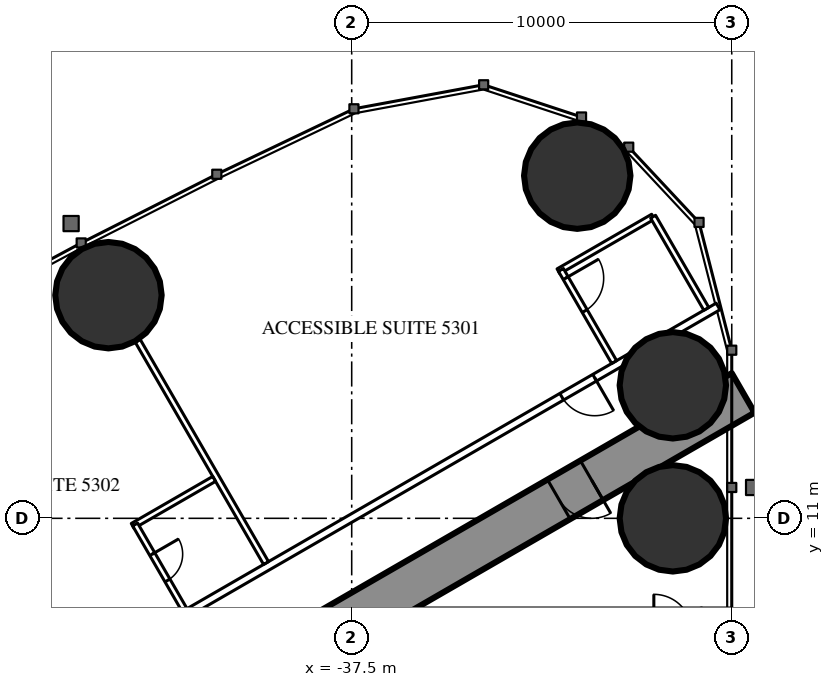
"""IFC4 building model, lengths in metres.
Left out: names, types, materials, properties, quantities, classifications, styles, units other than length and angle.
Written with IfcOpenShell. Run it as: python <this file> out.ifc"""

import sys

from ifc_helpers import new_model, si_unit, direction, frame, frame_2d, origin, origin_2d, place, context, subcontext, project, spatial, rectangle, circle, extrude, element, fill, save


model = new_model("IFC4")
c1 = context("Model", 3, precision=1e-05, world=origin(), true_north=direction((0.0, 1.0)))
c2 = subcontext(c1, "Body", "Model", "MODEL_VIEW")
j1 = project(units=[si_unit("LENGTHUNIT", "METRE"), si_unit("PLANEANGLEUNIT", "RADIAN")], contexts=[c1])
p1 = place(None, origin())
s1 = spatial("IfcSite", under=j1, at=p1, CompositionType="ELEMENT")
p2 = place(p1, origin())
s2 = spatial("IfcBuilding", under=s1, at=p2, CompositionType="ELEMENT")
p3 = place(p2, frame((0.0, 0.0, 198.3)))
s3 = spatial("IfcBuildingStorey", under=s2, at=p3, CompositionType="ELEMENT", Elevation=198.3)
for number, where, z_axis, x_axis in (
    (1, (-31.565, 20.016, 0.0), (0.0, 0.0, 1.0), (1.0, 0.0, 0.0)),
    (2, (-29.05, 11.0, 0.0), (0.0, 0.0, 1.0), (1.0, 0.0, 0.0)),
    (3, (-29.05, 14.5, 0.0), (0.0, 0.0, 1.0), (1.0, 0.0, 0.0)),
    (4, (-43.9, 16.871, 0.0), (0.0, 0.0, 1.0), (1.0, 0.0, 0.0)),
):
    element("IfcColumn", number, at=place(p3, frame(where, z_axis=z_axis, x_axis=x_axis)), inside=s3, PredefinedType="COLUMN", context=c2, shape_type="SweptSolid", body=[
        extrude(circle(Radius=1.4, at=origin_2d()), origin(), (0.0, 0.0, 1.0), 3.5),
    ])
p4 = place(p3, frame((-27.2, 14.3, 0.0), z_axis=(0.0, 0.0, 1.0), x_axis=(-0.866026593062, -0.499997940104, 0.0)))
e5 = element("IfcWall", 5, at=p4, inside=s3, PredefinedType="SHEAR", context=c2, shape_type="SweptSolid", body=[
    extrude(rectangle(XDim=28.946, YDim=1.2, at=frame_2d((14.473, 0.0))), origin(), (0.0, 0.0, 1.0), 3.5),
])
p5 = place(p4, frame((4.6, 0.0, 0.0)))
e6 = element("IfcOpeningElement", 6, at=p5, cuts=e5, PredefinedType="OPENING", context=c2, shape_type="SweptSolid", body=[
    extrude(rectangle(XDim=1.0, YDim=2.2, at=frame_2d((0.5, 1.1))), frame((0.0, 0.61, 0.0), z_axis=(0.0, -1.0, 0.0), x_axis=(1.0, 0.0, 0.0)), (0.0, 0.0, 1.0), 1.22),
])
p6 = place(p4, frame((13.395, 0.0, 0.0)))
e7 = element("IfcOpeningElement", 7, at=p6, cuts=e5, PredefinedType="OPENING", context=c2, shape_type="SweptSolid", body=[
    extrude(rectangle(XDim=1.8, YDim=2.2, at=frame_2d((0.9, 1.1))), frame((0.0, 0.61, 0.0), z_axis=(0.0, -1.0, 0.0), x_axis=(1.0, 0.0, 0.0)), (0.0, 0.0, 1.0), 1.22),
])
p7 = place(p3, frame((-27.86, 16.575, 0.0), z_axis=(0.0, 0.0, 1.0), x_axis=(-0.866025533911, -0.499999774615, 0.0)))
e8 = element("IfcWall", 8, at=p7, inside=s3, PredefinedType="PARTITIONING", context=c2, shape_type="SweptSolid", body=[
    extrude(rectangle(XDim=33.149, YDim=0.2, at=frame_2d((16.575, 0.0))), origin(), (0.0, 0.0, 1.0), 3.25),
])
p8 = place(p7, frame((3.75, 0.0, 0.0)))
e9 = element("IfcOpeningElement", 9, at=p8, cuts=e8, PredefinedType="OPENING", context=c2, shape_type="SweptSolid", body=[
    extrude(rectangle(XDim=1.0, YDim=2.2, at=frame_2d((0.5, 1.1))), frame((0.0, 0.11, 0.0), z_axis=(0.0, -1.0, 0.0), x_axis=(1.0, 0.0, 0.0)), (0.0, 0.0, 1.0), 0.22),
])
p9 = place(p7, frame((16.402, 0.0, 0.0)))
e10 = element("IfcOpeningElement", 10, at=p9, cuts=e8, PredefinedType="OPENING", context=c2, shape_type="SweptSolid", body=[
    extrude(rectangle(XDim=0.95, YDim=2.2, at=frame_2d((0.475, 1.1))), frame((0.0, 0.11, 0.0), z_axis=(0.0, -1.0, 0.0), x_axis=(1.0, 0.0, 0.0)), (0.0, 0.0, 1.0), 0.22),
])
p10 = place(p7, frame((22.047, 0.0, 0.0)))
e11 = element("IfcOpeningElement", 11, at=p10, cuts=e8, PredefinedType="OPENING", context=c2, shape_type="SweptSolid", body=[
    extrude(rectangle(XDim=0.95, YDim=2.2, at=frame_2d((0.475, 1.1))), frame((0.0, 0.11, 0.0), z_axis=(0.0, -1.0, 0.0), x_axis=(1.0, 0.0, 0.0)), (0.0, 0.0, 1.0), 0.22),
])
p11 = place(p7, frame((30.396, 0.0, 0.0)))
e12 = element("IfcOpeningElement", 12, at=p11, cuts=e8, PredefinedType="OPENING", context=c2, shape_type="SweptSolid", body=[
    extrude(rectangle(XDim=1.8, YDim=2.2, at=frame_2d((0.9, 1.1))), frame((0.0, 0.11, 0.0), z_axis=(0.0, -1.0, 0.0), x_axis=(1.0, 0.0, 0.0)), (0.0, 0.0, 1.0), 0.22),
])
p12 = place(p3, frame((-39.754, 9.823, 0.0), z_axis=(0.0, 0.0, 1.0), x_axis=(-0.499997670926, 0.866026748472, 0.0)))
e13 = element("IfcWall", 13, at=p12, inside=s3, PredefinedType="PARTITIONING", context=c2, shape_type="SweptSolid", body=[
    extrude(rectangle(XDim=6.757, YDim=0.15, at=frame_2d((3.379, 0.0))), origin(), (0.0, 0.0, 1.0), 2.3),
])
p13 = place(p3, frame((-29.57, 18.936, 0.0), z_axis=(0.0, 0.0, 1.0), x_axis=(-0.866018712932, -0.500011588718, 0.0)))
e14 = element("IfcWall", 14, at=p13, inside=s3, PredefinedType="PARTITIONING", context=c2, shape_type="SweptSolid", body=[
    extrude(rectangle(XDim=2.875, YDim=0.15, at=frame_2d((1.438, 0.0))), origin(), (0.0, 0.0, 1.0), 3.25),
])
p14 = place(p3, frame((-30.595, 15.111, 0.0), z_axis=(0.0, 0.0, 1.0), x_axis=(-0.49998411664, 0.866034573852, 0.0)))
e15 = element("IfcWall", 15, at=p14, inside=s3, PredefinedType="PARTITIONING", context=c2, shape_type="SweptSolid", body=[
    extrude(rectangle(XDim=2.8, YDim=0.15, at=frame_2d((1.4, 0.0))), origin(), (0.0, 0.0, 1.0), 3.25),
])
p15 = place(p14, frame((1.55, 0.0, 0.0)))
e16 = element("IfcOpeningElement", 16, at=p15, cuts=e15, PredefinedType="OPENING", context=c2, shape_type="SweptSolid", body=[
    extrude(rectangle(XDim=1.0, YDim=2.2, at=frame_2d((0.5, 1.1))), frame((0.0, 0.085, 0.0), z_axis=(0.0, -1.0, 0.0), x_axis=(1.0, 0.0, 0.0)), (0.0, 0.0, 1.0), 0.17),
])
p16 = place(p3, frame((-28.17, 16.511, 0.0), z_axis=(0.0, 0.0, 1.0), x_axis=(-0.49994636267, 0.866056369097, 0.0)))
e17 = element("IfcWall", 17, at=p16, inside=s3, PredefinedType="PARTITIONING", context=c2, shape_type="SweptSolid", body=[
    extrude(rectangle(XDim=2.8, YDim=0.15, at=frame_2d((1.4, 0.0))), origin(), (0.0, 0.0, 1.0), 3.25),
])
p17 = place(p3, frame((-41.119, 12.037, 0.0), z_axis=(0.0, 0.0, 1.0), x_axis=(-0.866073894602, -0.499916002032, 0.0)))
e18 = element("IfcWall", 18, at=p17, inside=s3, PredefinedType="PARTITIONING", context=c2, shape_type="SweptSolid", body=[
    extrude(rectangle(XDim=2.475, YDim=0.15, at=frame_2d((1.238, 0.0))), origin(), (0.0, 0.0, 1.0), 3.25),
])
p18 = place(p3, frame((-41.898, 8.585, 0.0), z_axis=(0.0, 0.0, 1.0), x_axis=(-0.500006934395, 0.866021400173, 0.0)))
e19 = element("IfcWall", 19, at=p18, inside=s3, PredefinedType="PARTITIONING", context=c2, shape_type="SweptSolid", body=[
    extrude(rectangle(XDim=2.6, YDim=0.15, at=frame_2d((1.3, 0.0))), origin(), (0.0, 0.0, 1.0), 3.25),
])
p19 = place(p18, frame((0.9, 0.0, 0.0)))
e20 = element("IfcOpeningElement", 20, at=p19, cuts=e19, PredefinedType="OPENING", context=c2, shape_type="SweptSolid", body=[
    extrude(rectangle(XDim=0.8, YDim=2.2, at=frame_2d((0.4, 1.1))), frame((0.0, 0.085, 0.0), z_axis=(0.0, -1.0, 0.0), x_axis=(1.0, 0.0, 0.0)), (0.0, 0.0, 1.0), 0.17),
])
p20 = place(p15, origin())
e21 = element("IfcDoor", 21, at=p20, inside=s3, OperationType="SINGLE_SWING_RIGHT", PredefinedType="DOOR", context=c2, shape_type="SweptSolid", body=[
    extrude(rectangle(XDim=1.0, YDim=2.2, at=frame_2d((0.5, 1.1))), frame((0.0, 0.025, 0.0), z_axis=(0.0, -1.0, 0.0), x_axis=(1.0, 0.0, 0.0)), (0.0, 0.0, 1.0), 0.05),
])
fill(e16, e21)
p21 = place(p8, origin())
e22 = element("IfcDoor", 22, at=p21, inside=s3, OperationType="SINGLE_SWING_LEFT", PredefinedType="DOOR", context=c2, shape_type="SweptSolid", body=[
    extrude(rectangle(XDim=1.0, YDim=2.2, at=frame_2d((0.5, 1.1))), frame((0.0, 0.025, 0.0), z_axis=(0.0, -1.0, 0.0), x_axis=(1.0, 0.0, 0.0)), (0.0, 0.0, 1.0), 0.05),
])
fill(e9, e22)
p22 = place(p19, origin())
e23 = element("IfcDoor", 23, at=p22, inside=s3, OperationType="SINGLE_SWING_RIGHT", PredefinedType="DOOR", context=c2, shape_type="SweptSolid", body=[
    extrude(rectangle(XDim=0.8, YDim=2.2, at=frame_2d((0.4, 1.1))), frame((0.0, 0.025, 0.0), z_axis=(0.0, -1.0, 0.0), x_axis=(1.0, 0.0, 0.0)), (0.0, 0.0, 1.0), 0.05),
])
fill(e20, e23)
p23 = place(p5, origin())
e24 = element("IfcDoor", 24, at=p23, inside=s3, OperationType="SINGLE_SWING_LEFT", PredefinedType="DOOR", context=c2, shape_type="SweptSolid", body=[
    extrude(rectangle(XDim=1.0, YDim=2.2, at=frame_2d((0.5, 1.1))), frame((0.0, 0.025, 0.0), z_axis=(0.0, -1.0, 0.0), x_axis=(1.0, 0.0, 0.0)), (0.0, 0.0, 1.0), 0.05),
])
fill(e6, e24)
save(model, sys.argv[1])
